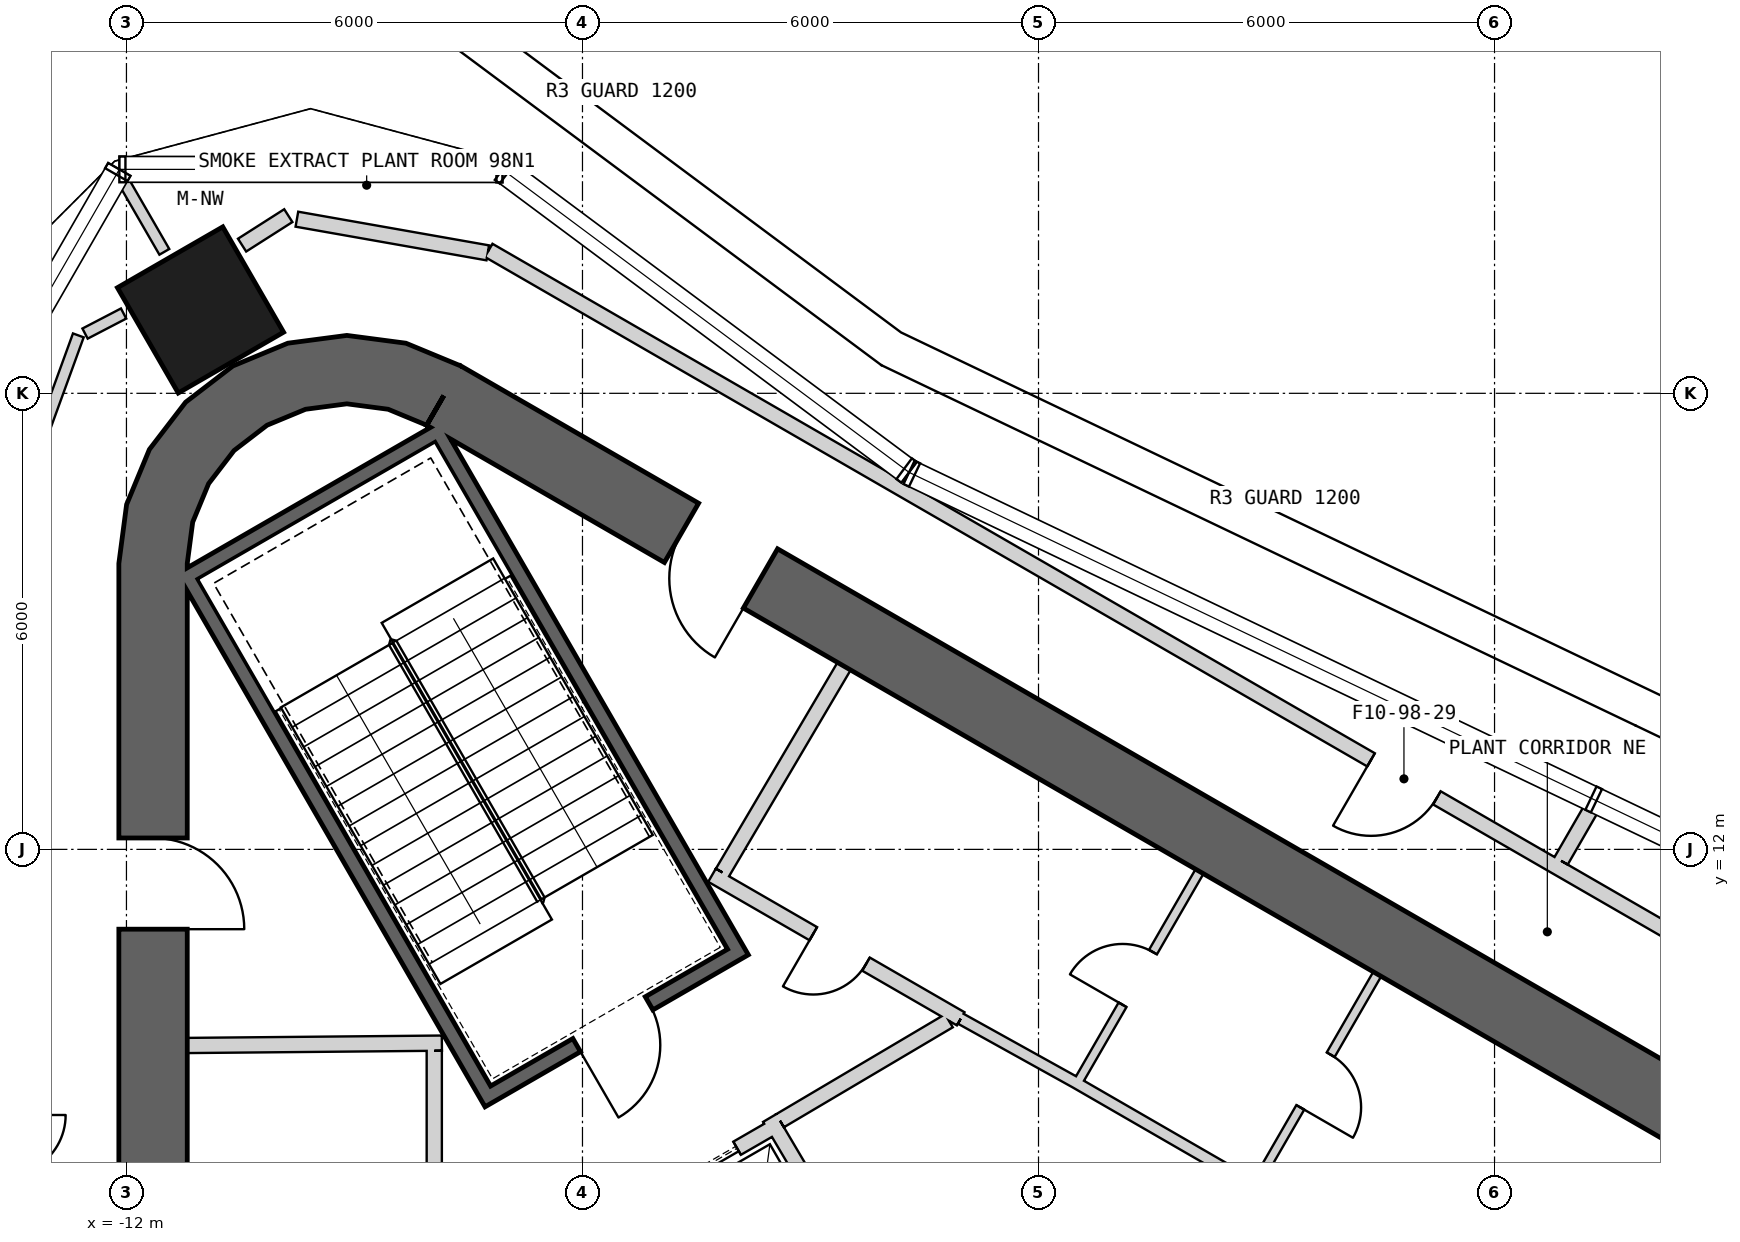
"""IFC4 building model, lengths in metres.
Left out: names, types, materials, properties, quantities, classifications, styles, units other than length and angle.
Written with IfcOpenShell. Run it as: python <this file> out.ifc"""

import sys

from ifc_helpers import new_model, si_unit, direction, frame, frame_2d, origin, origin_2d, place, context, subcontext, project, spatial, polyline, rectangle, outline, extrude, element, fill, save


model = new_model("IFC4")
c1 = context("Model", 3, precision=1e-05, world=origin(), true_north=direction((0.0, 1.0)))
c2 = subcontext(c1, "Body", "Model", "MODEL_VIEW")
j1 = project(units=[si_unit("LENGTHUNIT", "METRE"), si_unit("PLANEANGLEUNIT", "RADIAN")], contexts=[c1])
p1 = place(None, origin())
s1 = spatial("IfcSite", under=j1, at=p1, CompositionType="ELEMENT")
p2 = place(p1, origin())
s2 = spatial("IfcBuilding", under=s1, at=p2, CompositionType="ELEMENT")
p3 = place(p2, frame((0.0, 0.0, 435.3)))
s3 = spatial("IfcBuildingStorey", under=s2, at=p3, CompositionType="ELEMENT", Elevation=435.3)
p4 = place(p3, frame((-11.025, 19.097, 0.0), z_axis=(0.0, 0.0, 1.0), x_axis=(-0.5, 0.866025403784, 0.0)))
e1 = element("IfcColumn", 1, at=p4, inside=s3, PredefinedType="COLUMN", context=c2, shape_type="SweptSolid", body=[
    extrude(rectangle(XDim=1.6, YDim=1.6, at=origin_2d()), origin(), (0.0, 0.0, 1.0), 5.0),
])
p5 = place(p3, frame((19.475, 2.208, 0.0), z_axis=(0.0, 0.0, 1.0), x_axis=(-0.866028369851, 0.499994862586, 0.0)))
e2 = element("IfcWall", 2, at=p5, inside=s3, PredefinedType="SHEAR", context=c2, shape_type="SweptSolid", body=[
    extrude(rectangle(XDim=31.523, YDim=0.9, at=frame_2d((15.762, 0.0))), origin(), (0.0, 0.0, 1.0), 5.0),
])
p6 = place(p5, frame((3.612, 0.0, 0.0)))
e3 = element("IfcOpeningElement", 3, at=p6, cuts=e2, PredefinedType="OPENING", context=c2, shape_type="SweptSolid", body=[
    extrude(rectangle(XDim=1.2, YDim=2.4, at=frame_2d((0.6, 1.2))), frame((0.0, 0.46, 0.0), z_axis=(0.0, -1.0, 0.0), x_axis=(1.0, 0.0, 0.0)), (0.0, 0.0, 1.0), 0.92),
])
p7 = place(p5, frame((26.712, 0.0, 0.0)))
e4 = element("IfcOpeningElement", 4, at=p7, cuts=e2, PredefinedType="OPENING", context=c2, shape_type="SweptSolid", body=[
    extrude(rectangle(XDim=1.2, YDim=2.4, at=frame_2d((0.6, 1.2))), frame((0.0, 0.46, 0.0), z_axis=(0.0, -1.0, 0.0), x_axis=(1.0, 0.0, 0.0)), (0.0, 0.0, 1.0), 0.92),
])
p8 = place(p3, frame((-11.65, 15.762, 0.0), z_axis=(0.0, 0.0, 1.0), x_axis=(0.0, -1.0, 0.0)))
e5 = element("IfcWall", 5, at=p8, inside=s3, PredefinedType="SHEAR", context=c2, shape_type="SweptSolid", body=[
    extrude(rectangle(XDim=31.523, YDim=0.9, at=frame_2d((15.762, 0.0))), origin(), (0.0, 0.0, 1.0), 5.0),
])
p9 = place(p8, frame((3.612, 0.0, 0.0)))
e6 = element("IfcOpeningElement", 6, at=p9, cuts=e5, PredefinedType="OPENING", context=c2, shape_type="SweptSolid", body=[
    extrude(rectangle(XDim=1.2, YDim=2.4, at=frame_2d((0.6, 1.2))), frame((0.0, 0.46, 0.0), z_axis=(0.0, -1.0, 0.0), x_axis=(1.0, 0.0, 0.0)), (0.0, 0.0, 1.0), 0.92),
])
p10 = place(p8, frame((26.712, 0.0, 0.0)))
e7 = element("IfcOpeningElement", 7, at=p10, cuts=e5, PredefinedType="OPENING", context=c2, shape_type="SweptSolid", body=[
    extrude(rectangle(XDim=1.2, YDim=2.4, at=frame_2d((0.6, 1.2))), frame((0.0, 0.46, 0.0), z_axis=(0.0, -1.0, 0.0), x_axis=(1.0, 0.0, 0.0)), (0.0, 0.0, 1.0), 0.92),
])
p11 = place(p3, origin())
e8 = element("IfcWall", 8, at=p11, inside=s3, PredefinedType="SHEAR", context=c2, shape_type="SweptSolid", body=[
    extrude(outline(polyline([(-7.6, 18.36), (-8.323, 18.659), (-9.1, 18.762), (-9.876, 18.659), (-10.6, 18.36), (-11.221, 17.883), (-11.698, 17.262), (-11.998, 16.538), (-12.1, 15.762), (-11.2, 15.762), (-11.128, 16.305), (-10.919, 16.812), (-10.585, 17.247), (-10.15, 17.58), (-9.644, 17.79), (-9.1, 17.862), (-8.556, 17.79), (-8.05, 17.58), (-7.6, 18.36)])), origin(), (0.0, 0.0, 1.0), 5.0),
])
p12 = place(p3, frame((-11.245, 15.678, -0.25), z_axis=(0.0, 0.0, 1.0), x_axis=(0.499977274689, -0.866038523851, 0.0)))
e9 = element("IfcWall", 9, at=p12, inside=s3, PredefinedType="SHEAR", context=c2, shape_type="SweptSolid", body=[
    extrude(rectangle(XDim=8.1, YDim=0.2, at=frame_2d((4.05, 0.0))), origin(), (0.0, 0.0, 1.0), 5.0),
])
p13 = place(p3, frame((-7.818, 17.541, -0.25), z_axis=(0.0, 0.0, 1.0), x_axis=(-0.866044365799, -0.499967155389, 0.0)))
e10 = element("IfcWall", 10, at=p13, inside=s3, PredefinedType="SHEAR", context=c2, shape_type="SweptSolid", body=[
    extrude(rectangle(XDim=3.8, YDim=0.2, at=frame_2d((1.9, 0.0))), origin(), (0.0, 0.0, 1.0), 5.0),
])
p14 = place(p3, frame((-7.854, 17.405, -0.25), z_axis=(0.0, 0.0, 1.0), x_axis=(0.499997992926, -0.866026562566, 0.0)))
e11 = element("IfcWall", 11, at=p14, inside=s3, PredefinedType="SHEAR", context=c2, shape_type="SweptSolid", body=[
    extrude(rectangle(XDim=7.9, YDim=0.2, at=frame_2d((3.95, 0.0))), origin(), (0.0, 0.0, 1.0), 5.0),
])
p15 = place(p3, frame((-7.159, 8.8, -0.25), z_axis=(0.0, 0.0, 1.0), x_axis=(0.866047807691, 0.499961193289, 0.0)))
e12 = element("IfcWall", 12, at=p15, inside=s3, PredefinedType="SHEAR", context=c2, shape_type="SweptSolid", body=[
    extrude(rectangle(XDim=3.6, YDim=0.2, at=frame_2d((1.8, 0.0))), origin(), (0.0, 0.0, 1.0), 5.0),
])
p16 = place(p15, frame((1.25, 0.0, 0.25)))
e13 = element("IfcOpeningElement", 13, at=p16, cuts=e12, PredefinedType="OPENING", context=c2, shape_type="SweptSolid", body=[
    extrude(rectangle(XDim=1.1, YDim=2.1, at=frame_2d((0.55, 1.05))), frame((0.0, 0.11, 0.0), z_axis=(0.0, -1.0, 0.0), x_axis=(1.0, 0.0, 0.0)), (0.0, 0.0, 1.0), 0.22),
])
p17 = place(p3, frame((-5.524, 7.168, 0.0), z_axis=(0.0, 0.0, 1.0), x_axis=(0.866024647952, 0.500001309137, 0.0)))
e14 = element("IfcWall", 14, at=p17, inside=s3, PredefinedType="PLUMBINGWALL", context=c2, shape_type="SweptSolid", body=[
    extrude(rectangle(XDim=2.4, YDim=0.2, at=frame_2d((1.2, 0.0))), origin(), (0.0, 0.0, 1.0), 4.75),
])
p18 = place(p17, frame((0.6, 0.0, 0.0)))
e15 = element("IfcOpeningElement", 15, at=p18, cuts=e14, PredefinedType="OPENING", context=c2, shape_type="SweptSolid", body=[
    extrude(rectangle(XDim=1.2, YDim=2.4, at=frame_2d((0.6, 1.2))), frame((0.0, 0.11, 0.0), z_axis=(0.0, -1.0, 0.0), x_axis=(1.0, 0.0, 0.0)), (0.0, 0.0, 1.0), 0.22),
])
p19 = place(p3, frame((-3.538, 8.465, 0.0), z_axis=(0.0, 0.0, 1.0), x_axis=(0.508616218331, -0.860993346345, 0.0)))
e16 = element("IfcWall", 16, at=p19, inside=s3, PredefinedType="PLUMBINGWALL", context=c2, shape_type="SweptSolid", body=[
    extrude(rectangle(XDim=3.2, YDim=0.2, at=frame_2d((1.6, 0.0))), origin(), (0.0, 0.0, 1.0), 4.75),
])
p20 = place(p3, frame((-7.85, 9.451, 0.0), z_axis=(0.0, 0.0, 1.0), x_axis=(-0.999957167047, -0.009255488683, 0.0)))
e17 = element("IfcWall", 17, at=p20, inside=s3, PredefinedType="PARTITIONING", context=c2, shape_type="SweptSolid", body=[
    extrude(rectangle(XDim=3.35, YDim=0.2, at=frame_2d((1.675, 0.0))), origin(), (0.0, 0.0, 1.0), 4.75),
])
p21 = place(p3, frame((-7.95, 5.772, 0.0), z_axis=(0.0, 0.0, 1.0), x_axis=(0.0, 1.0, 0.0)))
e18 = element("IfcWall", 18, at=p21, inside=s3, PredefinedType="PARTITIONING", context=c2, shape_type="SweptSolid", body=[
    extrude(rectangle(XDim=3.578, YDim=0.2, at=frame_2d((1.789, 0.0))), origin(), (0.0, 0.0, 1.0), 4.75),
])
p22 = place(p3, frame((-4.296, 11.66, 0.0), z_axis=(0.0, 0.0, 1.0), x_axis=(0.866027389382, -0.499996560828, 0.0)))
e19 = element("IfcWall", 19, at=p22, inside=s3, PredefinedType="PARTITIONING", context=c2, shape_type="SweptSolid", body=[
    extrude(rectangle(XDim=3.778, YDim=0.2, at=frame_2d((1.889, 0.0))), origin(), (0.0, 0.0, 1.0), 4.75),
])
p23 = place(p22, frame((1.539, 0.0, 0.0)))
e20 = element("IfcOpeningElement", 20, at=p23, cuts=e19, PredefinedType="OPENING", context=c2, shape_type="SweptSolid", body=[
    extrude(rectangle(XDim=0.8, YDim=2.1, at=frame_2d((0.4, 1.05))), frame((0.0, 0.11, 0.0), z_axis=(0.0, -1.0, 0.0), x_axis=(1.0, 0.0, 0.0)), (0.0, 0.0, 1.0), 0.22),
])
p24 = place(p3, frame((4.457, 10.359, 0.0), z_axis=(0.0, 0.0, 1.0), x_axis=(-0.500017246033, -0.866015446554, 0.0)))
e21 = element("IfcWall", 21, at=p24, inside=s3, PredefinedType="PARTITIONING", context=c2, shape_type="SweptSolid", body=[
    extrude(rectangle(XDim=3.25, YDim=0.12, at=frame_2d((1.625, 0.0))), origin(), (0.0, 0.0, 1.0), 4.75),
])
p25 = place(p24, frame((1.225, 0.0, 0.0)))
e22 = element("IfcOpeningElement", 22, at=p25, cuts=e21, PredefinedType="OPENING", context=c2, shape_type="SweptSolid", body=[
    extrude(rectangle(XDim=0.8, YDim=2.1, at=frame_2d((0.4, 1.05))), frame((0.0, 0.07, 0.0), z_axis=(0.0, -1.0, 0.0), x_axis=(1.0, 0.0, 0.0)), (0.0, 0.0, 1.0), 0.14),
])
p26 = place(p3, frame((7.497, 4.886, 0.0), z_axis=(0.0, 0.0, 1.0), x_axis=(-0.866030989016, 0.499990325971, 0.0)))
e23 = element("IfcWall", 23, at=p26, inside=s3, PredefinedType="PLUMBINGWALL", context=c2, shape_type="SweptSolid", body=[
    extrude(rectangle(XDim=8.1, YDim=0.15, at=frame_2d((4.05, 0.0))), origin(), (0.0, 0.0, 1.0), 4.75),
])
p27 = place(p26, frame((2.3, 0.0, 0.0)))
e24 = element("IfcOpeningElement", 24, at=p27, cuts=e23, PredefinedType="OPENING", context=c2, shape_type="SweptSolid", body=[
    extrude(rectangle(XDim=0.8, YDim=2.1, at=frame_2d((0.4, 1.05))), frame((0.0, 0.085, 0.0), z_axis=(0.0, -1.0, 0.0), x_axis=(1.0, 0.0, 0.0)), (0.0, 0.0, 1.0), 0.17),
])
p28 = place(p3, frame((0.494, 8.895, 0.0), z_axis=(0.0, 0.0, 1.0), x_axis=(0.500017246033, 0.866015446554, 0.0)))
e25 = element("IfcWall", 25, at=p28, inside=s3, PredefinedType="PARTITIONING", context=c2, shape_type="SweptSolid", body=[
    extrude(rectangle(XDim=3.25, YDim=0.12, at=frame_2d((1.625, 0.0))), origin(), (0.0, 0.0, 1.0), 4.75),
])
p29 = place(p28, frame((1.225, 0.0, 0.0)))
e26 = element("IfcOpeningElement", 26, at=p29, cuts=e25, PredefinedType="OPENING", context=c2, shape_type="SweptSolid", body=[
    extrude(rectangle(XDim=0.8, YDim=2.1, at=frame_2d((0.4, 1.05))), frame((0.0, 0.07, 0.0), z_axis=(0.0, -1.0, 0.0), x_axis=(1.0, 0.0, 0.0)), (0.0, 0.0, 1.0), 0.14),
])
p30 = place(p3, frame((-2.558, 14.409, 0.0), z_axis=(0.0, 0.0, 1.0), x_axis=(-0.508018930956, -0.861345903683, 0.0)))
e27 = element("IfcWall", 27, at=p30, inside=s3, PredefinedType="PARTITIONING", context=c2, shape_type="SweptSolid", body=[
    extrude(rectangle(XDim=3.15, YDim=0.2, at=frame_2d((1.575, 0.0))), origin(), (0.0, 0.0, 1.0), 4.75),
])
p31 = place(p3, frame((0.483, 8.936, 0.0), z_axis=(0.0, 0.0, 1.0), x_axis=(-0.874290944206, 0.485402250592, 0.0)))
e28 = element("IfcWall", 28, at=p31, inside=s3, PredefinedType="PLUMBINGWALL", context=c2, shape_type="SweptSolid", body=[
    extrude(rectangle(XDim=1.723, YDim=0.15, at=frame_2d((0.861, 0.0))), origin(), (0.0, 0.0, 1.0), 4.75),
])
p32 = place(p3, frame((-1.179, 9.745, 0.0), z_axis=(0.0, 0.0, 1.0), x_axis=(-0.860630814782, -0.509229418482, 0.0)))
e29 = element("IfcWall", 29, at=p32, inside=s3, PredefinedType="PARTITIONING", context=c2, shape_type="SweptSolid", body=[
    extrude(rectangle(XDim=2.582, YDim=0.2, at=frame_2d((1.291, 0.0))), origin(), (0.0, 0.0, 1.0), 4.75),
])
p33 = place(p3, frame((-12.633, 18.762, 0.0), z_axis=(0.0, 0.0, 1.0), x_axis=(-0.342084949285, -0.939669030815, 0.0)))
e30 = element("IfcWall", 30, at=p33, inside=s3, PredefinedType="PLUMBINGWALL", context=c2, shape_type="SweptSolid", body=[
    extrude(rectangle(XDim=2.752, YDim=0.15, at=frame_2d((1.376, 0.0))), origin(), (0.0, 0.0, 1.0), 4.75),
])
p34 = place(p3, frame((-12.038, 19.05, 0.0), z_axis=(0.0, 0.0, 1.0), x_axis=(-0.887223795035, -0.461339286778, 0.0)))
e31 = element("IfcWall", 31, at=p34, inside=s3, PredefinedType="PLUMBINGWALL", context=c2, shape_type="SweptSolid", body=[
    extrude(rectangle(XDim=0.572, YDim=0.15, at=frame_2d((0.286, 0.0))), origin(), (0.0, 0.0, 1.0), 4.75),
])
p35 = place(p3, frame((-11.501, 19.861, 0.0), z_axis=(0.0, 0.0, 1.0), x_axis=(-0.500107244371, 0.865963477364, 0.0)))
e32 = element("IfcWall", 32, at=p35, inside=s3, PredefinedType="PLUMBINGWALL", context=c2, shape_type="SweptSolid", body=[
    extrude(rectangle(XDim=1.098, YDim=0.15, at=frame_2d((0.549, 0.0))), origin(), (0.0, 0.0, 1.0), 3.93),
])
p36 = place(p3, frame((20.834, 3.675, 0.0), z_axis=(0.0, 0.0, 1.0), x_axis=(-0.866028536494, 0.499994573949, 0.0)))
e33 = element("IfcWall", 33, at=p36, inside=s3, PredefinedType="PARTITIONING", context=c2, shape_type="SweptSolid", body=[
    extrude(rectangle(XDim=32.411, YDim=0.2, at=frame_2d((16.206, 0.0))), origin(), (0.0, 0.0, 1.0), 4.75),
])
p37 = place(p36, frame((7.7, 0.0, 0.0)))
e34 = element("IfcOpeningElement", 34, at=p37, cuts=e33, PredefinedType="OPENING", context=c2, shape_type="SweptSolid", body=[
    extrude(rectangle(XDim=1.0, YDim=2.1, at=frame_2d((0.5, 1.05))), frame((0.0, 0.11, 0.0), z_axis=(0.0, -1.0, 0.0), x_axis=(1.0, 0.0, 0.0)), (0.0, 0.0, 1.0), 0.22),
])
p38 = place(p36, frame((18.006, 0.0, 0.0)))
e35 = element("IfcOpeningElement", 35, at=p38, cuts=e33, PredefinedType="OPENING", context=c2, shape_type="SweptSolid", body=[
    extrude(rectangle(XDim=1.0, YDim=2.1, at=frame_2d((0.5, 1.05))), frame((0.0, 0.11, 0.0), z_axis=(0.0, -1.0, 0.0), x_axis=(1.0, 0.0, 0.0)), (0.0, 0.0, 1.0), 0.22),
])
p39 = place(p3, frame((-9.87, 20.337, 0.0), z_axis=(0.0, 0.0, 1.0), x_axis=(-0.843326891705, -0.537400924569, 0.0)))
e36 = element("IfcWall", 36, at=p39, inside=s3, PredefinedType="PARTITIONING", context=c2, shape_type="SweptSolid", body=[
    extrude(rectangle(XDim=0.721, YDim=0.2, at=frame_2d((0.361, 0.0))), origin(), (0.0, 0.0, 1.0), 4.75),
])
p40 = place(p3, frame((-7.246, 19.848, 0.0), z_axis=(0.0, 0.0, 1.0), x_axis=(-0.984816315713, 0.173599609177, 0.0)))
e37 = element("IfcWall", 37, at=p40, inside=s3, PredefinedType="PARTITIONING", context=c2, shape_type="SweptSolid", body=[
    extrude(rectangle(XDim=2.55, YDim=0.2, at=frame_2d((1.275, 0.0))), origin(), (0.0, 0.0, 1.0), 4.75),
])
p41 = place(p3, frame((7.271, 12.534, 0.0), z_axis=(0.0, 0.0, 1.0), x_axis=(-0.500025443912, -0.866010713236, 0.0)))
e38 = element("IfcWall", 38, at=p41, inside=s3, PredefinedType="PARTITIONING", context=c2, shape_type="SweptSolid", body=[
    extrude(rectangle(XDim=0.791, YDim=0.2, at=frame_2d((0.395, 0.0))), origin(), (0.0, 0.0, 1.0), 4.75),
])
p42 = place(p16, origin())
e39 = element("IfcDoor", 39, at=p42, inside=s3, OperationType="SINGLE_SWING_LEFT", PredefinedType="USERDEFINED", context=c2, shape_type="SweptSolid", body=[
    extrude(rectangle(XDim=1.1, YDim=2.1, at=frame_2d((0.55, 1.05))), frame((0.0, 0.025, 0.0), z_axis=(0.0, -1.0, 0.0), x_axis=(1.0, 0.0, 0.0)), (0.0, 0.0, 1.0), 0.05),
])
fill(e13, e39)
p43 = place(p18, origin())
e40 = element("IfcDoor", 40, at=p43, inside=s3, OperationType="SLIDING_TO_LEFT", PredefinedType="USERDEFINED", context=c2, shape_type="SweptSolid", body=[
    extrude(rectangle(XDim=1.2, YDim=2.4, at=frame_2d((0.6, 1.2))), frame((0.0, 0.025, 0.0), z_axis=(0.0, -1.0, 0.0), x_axis=(1.0, 0.0, 0.0)), (0.0, 0.0, 1.0), 0.05),
])
fill(e15, e40)
p44 = place(p25, origin())
e41 = element("IfcDoor", 41, at=p44, inside=s3, OperationType="SINGLE_SWING_RIGHT", PredefinedType="USERDEFINED", context=c2, shape_type="SweptSolid", body=[
    extrude(rectangle(XDim=0.8, YDim=2.1, at=frame_2d((0.4, 1.05))), frame((0.0, 0.025, 0.0), z_axis=(0.0, -1.0, 0.0), x_axis=(1.0, 0.0, 0.0)), (0.0, 0.0, 1.0), 0.05),
])
fill(e22, e41)
p45 = place(p23, origin())
e42 = element("IfcDoor", 42, at=p45, inside=s3, OperationType="SINGLE_SWING_LEFT", PredefinedType="USERDEFINED", context=c2, shape_type="SweptSolid", body=[
    extrude(rectangle(XDim=0.8, YDim=2.1, at=frame_2d((0.4, 1.05))), frame((0.0, 0.025, 0.0), z_axis=(0.0, -1.0, 0.0), x_axis=(1.0, 0.0, 0.0)), (0.0, 0.0, 1.0), 0.05),
])
fill(e20, e42)
p46 = place(p29, origin())
e43 = element("IfcDoor", 43, at=p46, inside=s3, OperationType="SINGLE_SWING_LEFT", PredefinedType="USERDEFINED", context=c2, shape_type="SweptSolid", body=[
    extrude(rectangle(XDim=0.8, YDim=2.1, at=frame_2d((0.4, 1.05))), frame((0.0, 0.025, 0.0), z_axis=(0.0, -1.0, 0.0), x_axis=(1.0, 0.0, 0.0)), (0.0, 0.0, 1.0), 0.05),
])
fill(e26, e43)
p47 = place(p38, origin())
e44 = element("IfcDoor", 44, at=p47, inside=s3, OperationType="SINGLE_SWING_RIGHT", PredefinedType="USERDEFINED", context=c2, shape_type="SweptSolid", body=[
    extrude(rectangle(XDim=1.0, YDim=2.1, at=frame_2d((0.5, 1.05))), frame((0.0, 0.025, 0.0), z_axis=(0.0, -1.0, 0.0), x_axis=(1.0, 0.0, 0.0)), (0.0, 0.0, 1.0), 0.05),
])
fill(e35, e44)
p48 = place(p7, origin())
e45 = element("IfcDoor", 45, at=p48, inside=s3, OperationType="SINGLE_SWING_LEFT", PredefinedType="USERDEFINED", context=c2, shape_type="SweptSolid", body=[
    extrude(rectangle(XDim=1.2, YDim=2.4, at=frame_2d((0.6, 1.2))), frame((0.0, 0.025, 0.0), z_axis=(0.0, -1.0, 0.0), x_axis=(1.0, 0.0, 0.0)), (0.0, 0.0, 1.0), 0.05),
])
fill(e4, e45)
p49 = place(p9, origin())
e46 = element("IfcDoor", 46, at=p49, inside=s3, OperationType="SINGLE_SWING_RIGHT", PredefinedType="USERDEFINED", context=c2, shape_type="SweptSolid", body=[
    extrude(rectangle(XDim=1.2, YDim=2.4, at=frame_2d((0.6, 1.2))), frame((0.0, 0.025, 0.0), z_axis=(0.0, -1.0, 0.0), x_axis=(1.0, 0.0, 0.0)), (0.0, 0.0, 1.0), 0.05),
])
fill(e6, e46)
save(model, sys.argv[1])
